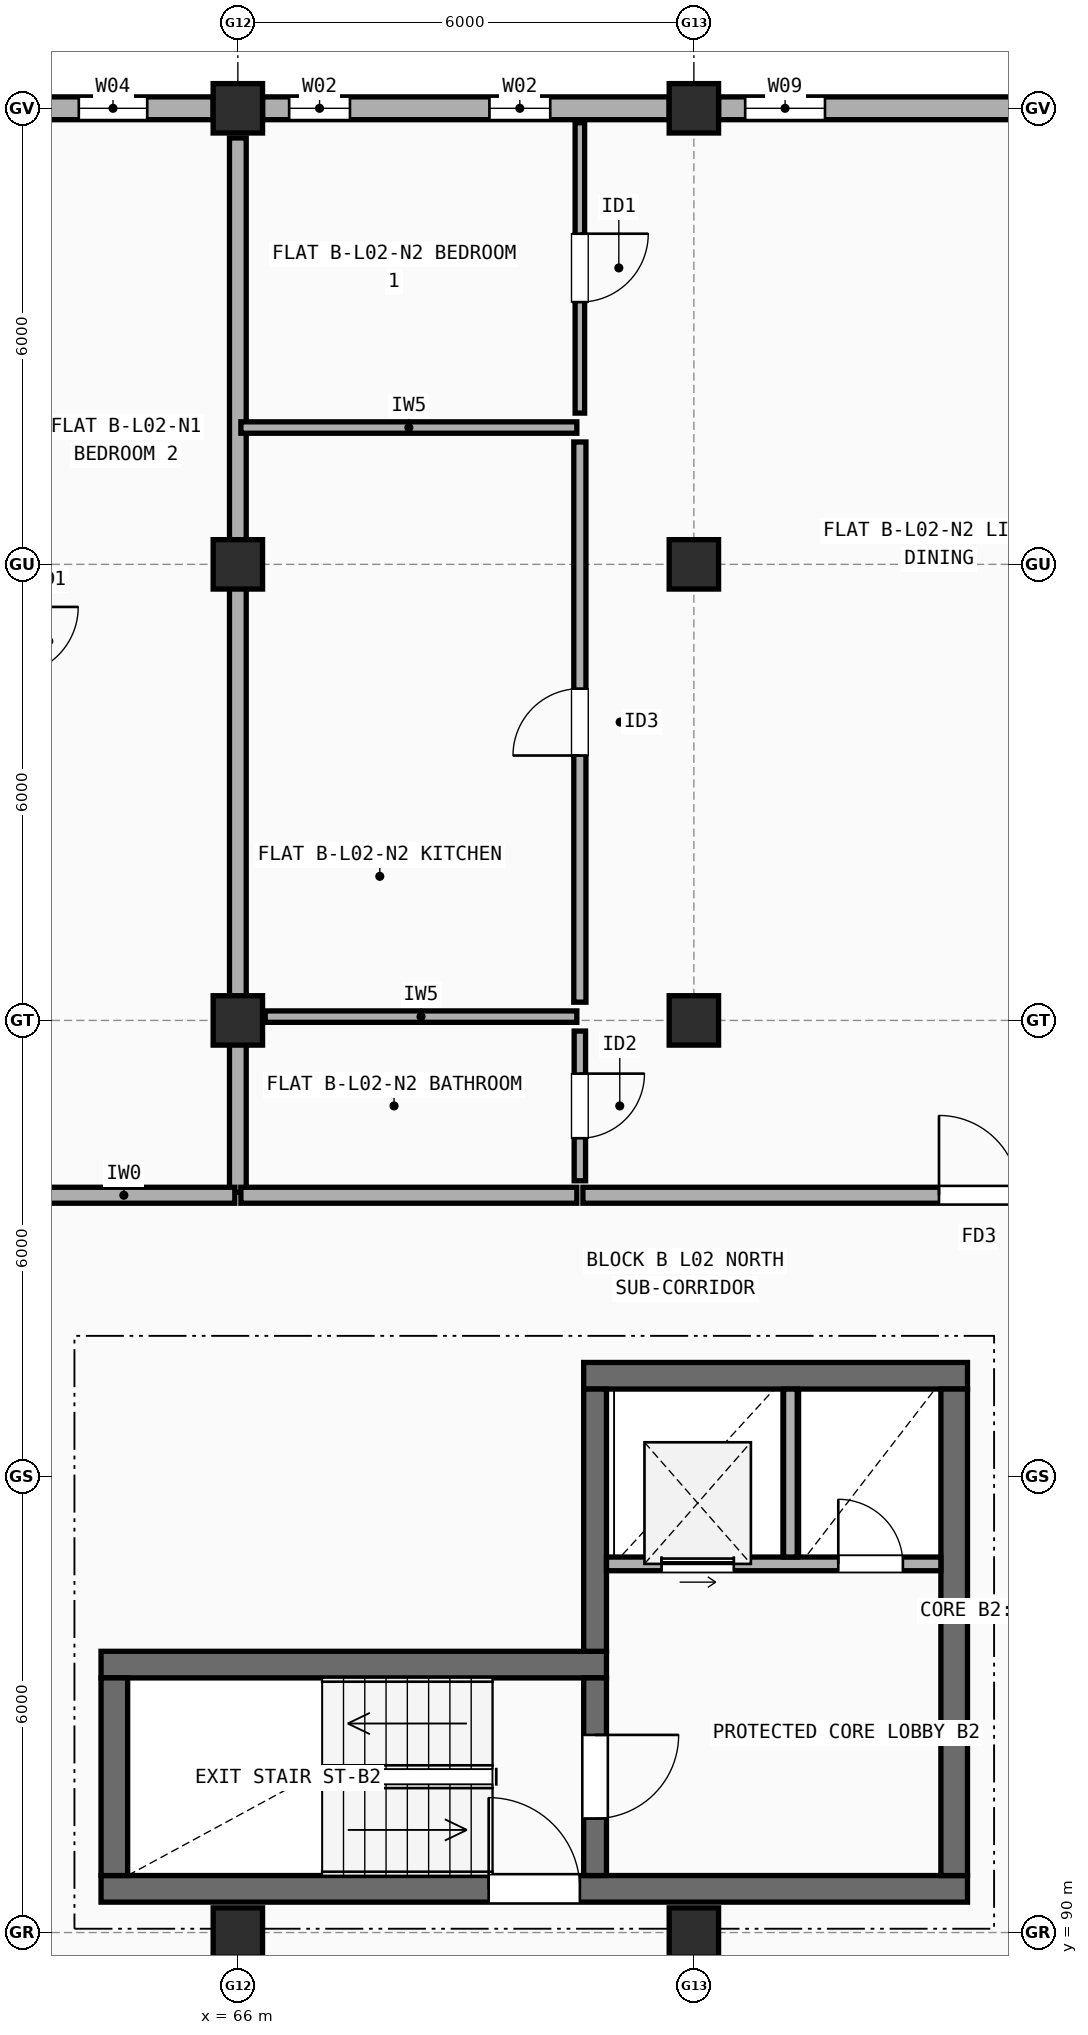
"""IFC4 building model, lengths in metres.
Left out: names, types, materials, properties, quantities, classifications, styles, units other than length and angle.
Written with IfcOpenShell. Run it as: python <this file> out.ifc"""

import sys

from ifc_helpers import new_model, si_unit, direction, frame, frame_2d, origin, origin_2d, place, context, subcontext, project, spatial, rectangle, extrude, element, fill, save


model = new_model("IFC4")
c1 = context("Model", 3, precision=1e-05, world=origin(), true_north=direction((0.0, 1.0)))
c2 = subcontext(c1, "Body", "Model", "MODEL_VIEW")
j1 = project(units=[si_unit("LENGTHUNIT", "METRE"), si_unit("PLANEANGLEUNIT", "RADIAN")], contexts=[c1])
p1 = place(None, origin())
s1 = spatial("IfcSite", under=j1, at=p1, CompositionType="ELEMENT")
p2 = place(p1, origin())
s2 = spatial("IfcBuilding", under=s1, at=p2, CompositionType="ELEMENT")
p3 = place(p2, frame((0.0, 0.0, 7.7)))
s3 = spatial("IfcBuildingStorey", under=s2, at=p3, CompositionType="ELEMENT", Elevation=7.7)
for number, where, z_axis, x_axis in (
    (1, (66.0, 90.0, 0.0), (0.0, 0.0, 1.0), (1.0, 0.0, 0.0)),
    (2, (66.0, 102.0, 0.0), (0.0, 0.0, 1.0), (1.0, 0.0, 0.0)),
    (3, (66.0, 108.0, 0.0), (0.0, 0.0, 1.0), (1.0, 0.0, 0.0)),
    (4, (66.0, 114.0, 0.0), (0.0, 0.0, 1.0), (1.0, 0.0, 0.0)),
    (5, (72.0, 90.0, 0.0), (0.0, 0.0, 1.0), (1.0, 0.0, 0.0)),
    (6, (72.0, 102.0, 0.0), (0.0, 0.0, 1.0), (1.0, 0.0, 0.0)),
    (7, (72.0, 108.0, 0.0), (0.0, 0.0, 1.0), (1.0, 0.0, 0.0)),
    (8, (72.0, 114.0, 0.0), (0.0, 0.0, 1.0), (1.0, 0.0, 0.0)),
):
    element("IfcColumn", number, at=place(p3, frame(where, z_axis=z_axis, x_axis=x_axis)), inside=s3, PredefinedType="COLUMN", context=c2, shape_type="SweptSolid", body=[
        extrude(rectangle(XDim=0.65, YDim=0.65, at=origin_2d()), origin(), (0.0, 0.0, 1.0), 2.955),
    ])
p4 = place(p3, frame((77.725, 114.0, 0.0), z_axis=(0.0, 0.0, 1.0), x_axis=(-1.0, 0.0, 0.0)))
e9 = element("IfcWall", 9, at=p4, inside=s3, PredefinedType="STANDARD", context=c2, shape_type="SweptSolid", body=[
    extrude(rectangle(XDim=5.4, YDim=0.3, at=frame_2d((2.7, 0.0))), origin(), (0.0, 0.0, 1.0), 2.437),
])
p5 = place(p4, frame((0.35, 0.0, 0.9)))
e10 = element("IfcOpeningElement", 10, at=p5, cuts=e9, PredefinedType="OPENING", context=c2, shape_type="SweptSolid", body=[
    extrude(rectangle(XDim=1.05, YDim=1.35, at=frame_2d((0.525, 0.675))), frame((0.0, 0.16, 0.0), z_axis=(0.0, -1.0, 0.0), x_axis=(1.0, 0.0, 0.0)), (0.0, 0.0, 1.0), 0.32),
])
p6 = place(p4, frame((4.0, 0.0, 0.9)))
e11 = element("IfcOpeningElement", 11, at=p6, cuts=e9, PredefinedType="OPENING", context=c2, shape_type="SweptSolid", body=[
    extrude(rectangle(XDim=1.05, YDim=1.35, at=frame_2d((0.525, 0.675))), frame((0.0, 0.16, 0.0), z_axis=(0.0, -1.0, 0.0), x_axis=(1.0, 0.0, 0.0)), (0.0, 0.0, 1.0), 0.32),
])
p7 = place(p3, frame((71.675, 114.0, 0.0), z_axis=(0.0, 0.0, 1.0), x_axis=(-1.0, 0.0, 0.0)))
e12 = element("IfcWall", 12, at=p7, inside=s3, PredefinedType="STANDARD", context=c2, shape_type="SweptSolid", body=[
    extrude(rectangle(XDim=5.35, YDim=0.3, at=frame_2d((2.675, 0.0))), origin(), (0.0, 0.0, 1.0), 2.437),
])
p8 = place(p7, frame((1.565, 0.0, 0.9)))
e13 = element("IfcOpeningElement", 13, at=p8, cuts=e12, PredefinedType="OPENING", context=c2, shape_type="SweptSolid", body=[
    extrude(rectangle(XDim=0.8, YDim=1.2, at=frame_2d((0.4, 0.6))), frame((0.0, 0.16, 0.0), z_axis=(0.0, -1.0, 0.0), x_axis=(1.0, 0.0, 0.0)), (0.0, 0.0, 1.0), 0.32),
])
p9 = place(p7, frame((4.2, 0.0, 0.9)))
e14 = element("IfcOpeningElement", 14, at=p9, cuts=e12, PredefinedType="OPENING", context=c2, shape_type="SweptSolid", body=[
    extrude(rectangle(XDim=0.8, YDim=1.2, at=frame_2d((0.4, 0.6))), frame((0.0, 0.16, 0.0), z_axis=(0.0, -1.0, 0.0), x_axis=(1.0, 0.0, 0.0)), (0.0, 0.0, 1.0), 0.32),
])
p10 = place(p3, frame((65.675, 114.0, 0.0), z_axis=(0.0, 0.0, 1.0), x_axis=(-1.0, 0.0, 0.0)))
e15 = element("IfcWall", 15, at=p10, inside=s3, PredefinedType="STANDARD", context=c2, shape_type="SweptSolid", body=[
    extrude(rectangle(XDim=5.35, YDim=0.3, at=frame_2d((2.675, 0.0))), origin(), (0.0, 0.0, 1.0), 2.437),
])
p11 = place(p10, frame((0.867, 0.0, 0.9)))
e16 = element("IfcOpeningElement", 16, at=p11, cuts=e15, PredefinedType="OPENING", context=c2, shape_type="SweptSolid", body=[
    extrude(rectangle(XDim=0.9, YDim=1.3, at=frame_2d((0.45, 0.65))), frame((0.0, 0.16, 0.0), z_axis=(0.0, -1.0, 0.0), x_axis=(1.0, 0.0, 0.0)), (0.0, 0.0, 1.0), 0.32),
])
p12 = place(p10, frame((3.558, 0.0, 0.9)))
e17 = element("IfcOpeningElement", 17, at=p12, cuts=e15, PredefinedType="OPENING", context=c2, shape_type="SweptSolid", body=[
    extrude(rectangle(XDim=0.95, YDim=1.35, at=frame_2d((0.475, 0.675))), frame((0.0, 0.16, 0.0), z_axis=(0.0, -1.0, 0.0), x_axis=(1.0, 0.0, 0.0)), (0.0, 0.0, 1.0), 0.32),
])
p13 = place(p3, frame((64.2, 90.575, 0.0), z_axis=(0.0, 0.0, 1.0), x_axis=(1.0, 0.0, 0.0)))
e18 = element("IfcWall", 18, at=p13, inside=s3, PredefinedType="SHEAR", context=c2, shape_type="SweptSolid", body=[
    extrude(rectangle(XDim=11.4, YDim=0.35, at=frame_2d((5.7, 0.0))), origin(), (0.0, 0.0, 1.0), 2.955),
])
p14 = place(p13, frame((5.1, 0.0, 0.0)))
e19 = element("IfcOpeningElement", 19, at=p14, cuts=e18, PredefinedType="OPENING", context=c2, shape_type="SweptSolid", body=[
    extrude(rectangle(XDim=1.2, YDim=2.15, at=frame_2d((0.6, 1.075))), frame((0.0, 0.185, 0.0), z_axis=(0.0, -1.0, 0.0), x_axis=(1.0, 0.0, 0.0)), (0.0, 0.0, 1.0), 0.37),
])
p15 = place(p3, frame((70.85, 93.525, 0.0), z_axis=(0.0, 0.0, 1.0), x_axis=(-1.0, 0.0, 0.0)))
e20 = element("IfcWall", 20, at=p15, inside=s3, PredefinedType="SHEAR", context=c2, shape_type="SweptSolid", body=[
    extrude(rectangle(XDim=6.65, YDim=0.35, at=frame_2d((3.325, 0.0))), origin(), (0.0, 0.0, 1.0), 2.955),
])
p16 = place(p3, frame((64.375, 93.35, 0.0), z_axis=(0.0, 0.0, 1.0), x_axis=(0.0, -1.0, 0.0)))
e21 = element("IfcWall", 21, at=p16, inside=s3, PredefinedType="SHEAR", context=c2, shape_type="SweptSolid", body=[
    extrude(rectangle(XDim=2.6, YDim=0.35, at=frame_2d((1.3, 0.0))), origin(), (0.0, 0.0, 1.0), 2.955),
])
p17 = place(p3, frame((70.7, 90.75, 0.0), z_axis=(0.0, 0.0, 1.0), x_axis=(0.0, 1.0, 0.0)))
e22 = element("IfcWall", 22, at=p17, inside=s3, PredefinedType="SHEAR", context=c2, shape_type="SweptSolid", body=[
    extrude(rectangle(XDim=2.6, YDim=0.3, at=frame_2d((1.3, 0.0))), origin(), (0.0, 0.0, 1.0), 2.955),
])
p18 = place(p17, frame((0.75, 0.0, 0.0)))
e23 = element("IfcOpeningElement", 23, at=p18, cuts=e22, PredefinedType="OPENING", context=c2, shape_type="SweptSolid", body=[
    extrude(rectangle(XDim=1.1, YDim=2.15, at=frame_2d((0.55, 1.075))), frame((0.0, 0.16, 0.0), z_axis=(0.0, -1.0, 0.0), x_axis=(1.0, 0.0, 0.0)), (0.0, 0.0, 1.0), 0.32),
])
p19 = place(p3, frame((75.6, 97.325, 0.0), z_axis=(0.0, 0.0, 1.0), x_axis=(-1.0, 0.0, 0.0)))
e24 = element("IfcWall", 24, at=p19, inside=s3, PredefinedType="SHEAR", context=c2, shape_type="SweptSolid", body=[
    extrude(rectangle(XDim=5.05, YDim=0.35, at=frame_2d((2.525, 0.0))), origin(), (0.0, 0.0, 1.0), 2.955),
])
p20 = place(p3, frame((75.425, 90.75, 0.0), z_axis=(0.0, 0.0, 1.0), x_axis=(0.0, 1.0, 0.0)))
e25 = element("IfcWall", 25, at=p20, inside=s3, PredefinedType="SHEAR", context=c2, shape_type="SweptSolid", body=[
    extrude(rectangle(XDim=6.4, YDim=0.35, at=frame_2d((3.2, 0.0))), origin(), (0.0, 0.0, 1.0), 2.955),
])
p21 = place(p3, frame((70.7, 93.7, 0.0), z_axis=(0.0, 0.0, 1.0), x_axis=(0.0, 1.0, 0.0)))
e26 = element("IfcWall", 26, at=p21, inside=s3, PredefinedType="SHEAR", context=c2, shape_type="SweptSolid", body=[
    extrude(rectangle(XDim=3.45, YDim=0.3, at=frame_2d((1.725, 0.0))), origin(), (0.0, 0.0, 1.0), 2.955),
])
p22 = place(p3, frame((70.85, 94.85, 0.0), z_axis=(0.0, 0.0, 1.0), x_axis=(1.0, 0.0, 0.0)))
e27 = element("IfcWall", 27, at=p22, inside=s3, PredefinedType="SOLIDWALL", context=c2, shape_type="SweptSolid", body=[
    extrude(rectangle(XDim=4.4, YDim=0.18, at=frame_2d((2.2, 0.0))), origin(), (0.0, 0.0, 1.0), 2.955),
])
p23 = place(p22, frame((0.725, 0.0, 0.0)))
e28 = element("IfcOpeningElement", 28, at=p23, cuts=e27, PredefinedType="OPENING", context=c2, shape_type="SweptSolid", body=[
    extrude(rectangle(XDim=0.95, YDim=2.15, at=frame_2d((0.475, 1.075))), frame((0.0, 0.1, 0.0), z_axis=(0.0, -1.0, 0.0), x_axis=(1.0, 0.0, 0.0)), (0.0, 0.0, 1.0), 0.2),
])
p24 = place(p22, frame((3.05, 0.0, 0.0)))
e29 = element("IfcOpeningElement", 29, at=p24, cuts=e27, PredefinedType="OPENING", context=c2, shape_type="SweptSolid", body=[
    extrude(rectangle(XDim=0.85, YDim=2.1, at=frame_2d((0.425, 1.05))), frame((0.0, 0.1, 0.0), z_axis=(0.0, -1.0, 0.0), x_axis=(1.0, 0.0, 0.0)), (0.0, 0.0, 1.0), 0.2),
])
p25 = place(p3, frame((73.27, 94.94, 0.0), z_axis=(0.0, 0.0, 1.0), x_axis=(0.0, 1.0, 0.0)))
e30 = element("IfcWall", 30, at=p25, inside=s3, PredefinedType="SOLIDWALL", context=c2, shape_type="SweptSolid", body=[
    extrude(rectangle(XDim=2.21, YDim=0.18, at=frame_2d((1.105, 0.0))), origin(), (0.0, 0.0, 1.0), 2.955),
])
p26 = place(p3, frame((66.0, 99.74, 0.0), z_axis=(0.0, 0.0, 1.0), x_axis=(0.0, 1.0, 0.0)))
e31 = element("IfcWall", 31, at=p26, inside=s3, PredefinedType="SOLIDWALL", context=c2, shape_type="SweptSolid", body=[
    extrude(rectangle(XDim=13.87, YDim=0.22, at=frame_2d((6.935, 0.0))), origin(), (0.0, 0.0, 1.0), 2.337),
])
p27 = place(p3, frame((63.04, 99.7, 0.0), z_axis=(0.0, 0.0, 1.0), x_axis=(1.0, 0.0, 0.0)))
e32 = element("IfcWall", 32, at=p27, inside=s3, PredefinedType="SOLIDWALL", context=c2, shape_type="SweptSolid", body=[
    extrude(rectangle(XDim=2.92, YDim=0.21, at=frame_2d((1.46, 0.0))), origin(), (0.0, 0.0, 1.0), 2.955),
])
p28 = place(p3, frame((66.04, 99.7, 0.0), z_axis=(0.0, 0.0, 1.0), x_axis=(1.0, 0.0, 0.0)))
e33 = element("IfcWall", 33, at=p28, inside=s3, PredefinedType="SOLIDWALL", context=c2, shape_type="SweptSolid", body=[
    extrude(rectangle(XDim=4.42, YDim=0.21, at=frame_2d((2.21, 0.0))), origin(), (0.0, 0.0, 1.0), 2.955),
])
p29 = place(p3, frame((70.54, 99.7, 0.0), z_axis=(0.0, 0.0, 1.0), x_axis=(1.0, 0.0, 0.0)))
e34 = element("IfcWall", 34, at=p29, inside=s3, PredefinedType="SOLIDWALL", context=c2, shape_type="SweptSolid", body=[
    extrude(rectangle(XDim=10.42, YDim=0.21, at=frame_2d((5.21, 0.0))), origin(), (0.0, 0.0, 1.0), 2.437),
])
p30 = place(p29, frame((4.685, 0.0, 0.0)))
e35 = element("IfcOpeningElement", 35, at=p30, cuts=e34, PredefinedType="OPENING", context=c2, shape_type="SweptSolid", body=[
    extrude(rectangle(XDim=1.05, YDim=2.15, at=frame_2d((0.525, 1.075))), frame((0.0, 0.115, 0.0), z_axis=(0.0, -1.0, 0.0), x_axis=(1.0, 0.0, 0.0)), (0.0, 0.0, 1.0), 0.23),
])
p31 = place(p3, frame((70.5, 109.99, 0.0), z_axis=(0.0, 0.0, 1.0), x_axis=(0.0, 1.0, 0.0)))
e36 = element("IfcWall", 36, at=p31, inside=s3, PredefinedType="PARTITIONING", context=c2, shape_type="SweptSolid", body=[
    extrude(rectangle(XDim=3.82, YDim=0.125, at=frame_2d((1.91, 0.0))), origin(), (0.0, 0.0, 1.0), 2.955),
])
p32 = place(p31, frame((1.46, 0.0, 0.0)))
e37 = element("IfcOpeningElement", 37, at=p32, cuts=e36, PredefinedType="OPENING", context=c2, shape_type="SweptSolid", body=[
    extrude(rectangle(XDim=0.9, YDim=2.1, at=frame_2d((0.45, 1.05))), frame((0.0, 0.073, 0.0), z_axis=(0.0, -1.0, 0.0), x_axis=(1.0, 0.0, 0.0)), (0.0, 0.0, 1.0), 0.145),
])
p33 = place(p3, frame((70.5, 102.24, 0.0), z_axis=(0.0, 0.0, 1.0), x_axis=(0.0, 1.0, 0.0)))
e38 = element("IfcWall", 38, at=p33, inside=s3, PredefinedType="PLUMBINGWALL", context=c2, shape_type="SweptSolid", body=[
    extrude(rectangle(XDim=7.37, YDim=0.16, at=frame_2d((3.685, 0.0))), origin(), (0.0, 0.0, 1.0), 2.437),
])
p34 = place(p33, frame((3.245, 0.0, 0.0)))
e39 = element("IfcOpeningElement", 39, at=p34, cuts=e38, PredefinedType="OPENING", context=c2, shape_type="SweptSolid", body=[
    extrude(rectangle(XDim=0.88, YDim=2.1, at=frame_2d((0.44, 1.05))), frame((0.0, 0.09, 0.0), z_axis=(0.0, -1.0, 0.0), x_axis=(1.0, 0.0, 0.0)), (0.0, 0.0, 1.0), 0.18),
])
p35 = place(p3, frame((70.5, 99.89, 0.0), z_axis=(0.0, 0.0, 1.0), x_axis=(0.0, 1.0, 0.0)))
e40 = element("IfcWall", 40, at=p35, inside=s3, PredefinedType="PARTITIONING", context=c2, shape_type="SweptSolid", body=[
    extrude(rectangle(XDim=1.97, YDim=0.15, at=frame_2d((0.985, 0.0))), origin(), (0.0, 0.0, 1.0), 2.955),
])
p36 = place(p35, frame((0.56, 0.0, 0.0)))
e41 = element("IfcOpeningElement", 41, at=p36, cuts=e40, PredefinedType="OPENING", context=c2, shape_type="SweptSolid", body=[
    extrude(rectangle(XDim=0.85, YDim=2.1, at=frame_2d((0.425, 1.05))), frame((0.0, 0.085, 0.0), z_axis=(0.0, -1.0, 0.0), x_axis=(1.0, 0.0, 0.0)), (0.0, 0.0, 1.0), 0.17),
])
p37 = place(p3, frame((66.04, 109.8, 0.0), z_axis=(0.0, 0.0, 1.0), x_axis=(1.0, 0.0, 0.0)))
e42 = element("IfcWall", 42, at=p37, inside=s3, PredefinedType="PARTITIONING", context=c2, shape_type="SweptSolid", body=[
    extrude(rectangle(XDim=4.42, YDim=0.15, at=frame_2d((2.21, 0.0))), origin(), (0.0, 0.0, 1.0), 2.337),
])
p38 = place(p3, frame((66.36, 102.05, 0.0), z_axis=(0.0, 0.0, 1.0), x_axis=(1.0, 0.0, 0.0)))
e43 = element("IfcWall", 43, at=p38, inside=s3, PredefinedType="PARTITIONING", context=c2, shape_type="SweptSolid", body=[
    extrude(rectangle(XDim=4.1, YDim=0.15, at=frame_2d((2.05, 0.0))), origin(), (0.0, 0.0, 1.0), 2.437),
])
p39 = place(p6, origin())
e44 = element("IfcWindow", 44, at=p39, inside=s3, PartitioningType="SINGLE_PANEL", PredefinedType="WINDOW", context=c2, shape_type="SweptSolid", body=[
    extrude(rectangle(XDim=1.05, YDim=1.35, at=frame_2d((0.525, 0.675))), frame((0.0, 0.03, 0.0), z_axis=(0.0, -1.0, 0.0), x_axis=(1.0, 0.0, 0.0)), (0.0, 0.0, 1.0), 0.06),
])
fill(e11, e44)
p40 = place(p8, origin())
e45 = element("IfcWindow", 45, at=p40, inside=s3, PartitioningType="SINGLE_PANEL", PredefinedType="WINDOW", context=c2, shape_type="SweptSolid", body=[
    extrude(rectangle(XDim=0.8, YDim=1.2, at=frame_2d((0.4, 0.6))), frame((0.0, 0.03, 0.0), z_axis=(0.0, -1.0, 0.0), x_axis=(1.0, 0.0, 0.0)), (0.0, 0.0, 1.0), 0.06),
])
fill(e13, e45)
p41 = place(p9, origin())
e46 = element("IfcWindow", 46, at=p41, inside=s3, PartitioningType="SINGLE_PANEL", PredefinedType="WINDOW", context=c2, shape_type="SweptSolid", body=[
    extrude(rectangle(XDim=0.8, YDim=1.2, at=frame_2d((0.4, 0.6))), frame((0.0, 0.03, 0.0), z_axis=(0.0, -1.0, 0.0), x_axis=(1.0, 0.0, 0.0)), (0.0, 0.0, 1.0), 0.06),
])
fill(e14, e46)
p42 = place(p11, origin())
e47 = element("IfcWindow", 47, at=p42, inside=s3, PartitioningType="SINGLE_PANEL", PredefinedType="WINDOW", context=c2, shape_type="SweptSolid", body=[
    extrude(rectangle(XDim=0.9, YDim=1.3, at=frame_2d((0.45, 0.65))), frame((0.0, 0.03, 0.0), z_axis=(0.0, -1.0, 0.0), x_axis=(1.0, 0.0, 0.0)), (0.0, 0.0, 1.0), 0.06),
])
fill(e16, e47)
p43 = place(p14, origin())
e48 = element("IfcDoor", 48, at=p43, inside=s3, OperationType="SINGLE_SWING_LEFT", PredefinedType="DOOR", context=c2, shape_type="SweptSolid", body=[
    extrude(rectangle(XDim=1.2, YDim=2.15, at=frame_2d((0.6, 1.075))), frame((0.0, 0.025, 0.0), z_axis=(0.0, -1.0, 0.0), x_axis=(1.0, 0.0, 0.0)), (0.0, 0.0, 1.0), 0.05),
])
fill(e19, e48)
p44 = place(p18, origin())
e49 = element("IfcDoor", 49, at=p44, inside=s3, OperationType="SINGLE_SWING_RIGHT", PredefinedType="DOOR", context=c2, shape_type="SweptSolid", body=[
    extrude(rectangle(XDim=1.1, YDim=2.15, at=frame_2d((0.55, 1.075))), frame((0.0, 0.025, 0.0), z_axis=(0.0, -1.0, 0.0), x_axis=(1.0, 0.0, 0.0)), (0.0, 0.0, 1.0), 0.05),
])
fill(e23, e49)
p45 = place(p23, origin())
e50 = element("IfcDoor", 50, at=p45, inside=s3, OperationType="SLIDING_TO_LEFT", PredefinedType="DOOR", context=c2, shape_type="SweptSolid", body=[
    extrude(rectangle(XDim=0.95, YDim=2.15, at=frame_2d((0.475, 1.075))), frame((0.0, 0.025, 0.0), z_axis=(0.0, -1.0, 0.0), x_axis=(1.0, 0.0, 0.0)), (0.0, 0.0, 1.0), 0.05),
])
fill(e28, e50)
p46 = place(p24, frame((0.85, 0.0, 0.0), z_axis=(0.0, 0.0, 1.0), x_axis=(-1.0, 0.0, 0.0)))
e51 = element("IfcDoor", 51, at=p46, inside=s3, OperationType="SINGLE_SWING_LEFT", PredefinedType="DOOR", context=c2, shape_type="SweptSolid", body=[
    extrude(rectangle(XDim=0.85, YDim=2.1, at=frame_2d((0.425, 1.05))), frame((0.0, 0.025, 0.0), z_axis=(0.0, -1.0, 0.0), x_axis=(1.0, 0.0, 0.0)), (0.0, 0.0, 1.0), 0.05),
])
fill(e29, e51)
p47 = place(p30, origin())
e52 = element("IfcDoor", 52, at=p47, inside=s3, OperationType="SINGLE_SWING_LEFT", PredefinedType="DOOR", context=c2, shape_type="SweptSolid", body=[
    extrude(rectangle(XDim=1.05, YDim=2.15, at=frame_2d((0.525, 1.075))), frame((0.0, 0.025, 0.0), z_axis=(0.0, -1.0, 0.0), x_axis=(1.0, 0.0, 0.0)), (0.0, 0.0, 1.0), 0.05),
])
fill(e35, e52)
p48 = place(p32, origin())
e53 = element("IfcDoor", 53, at=p48, inside=s3, OperationType="SINGLE_SWING_RIGHT", PredefinedType="DOOR", context=c2, shape_type="SweptSolid", body=[
    extrude(rectangle(XDim=0.9, YDim=2.1, at=frame_2d((0.45, 1.05))), frame((0.0, 0.025, 0.0), z_axis=(0.0, -1.0, 0.0), x_axis=(1.0, 0.0, 0.0)), (0.0, 0.0, 1.0), 0.05),
])
fill(e37, e53)
p49 = place(p34, origin())
e54 = element("IfcDoor", 54, at=p49, inside=s3, OperationType="SINGLE_SWING_LEFT", PredefinedType="DOOR", context=c2, shape_type="SweptSolid", body=[
    extrude(rectangle(XDim=0.88, YDim=2.1, at=frame_2d((0.44, 1.05))), frame((0.0, 0.025, 0.0), z_axis=(0.0, -1.0, 0.0), x_axis=(1.0, 0.0, 0.0)), (0.0, 0.0, 1.0), 0.05),
])
fill(e39, e54)
p50 = place(p36, origin())
e55 = element("IfcDoor", 55, at=p50, inside=s3, OperationType="SINGLE_SWING_RIGHT", PredefinedType="DOOR", context=c2, shape_type="SweptSolid", body=[
    extrude(rectangle(XDim=0.85, YDim=2.1, at=frame_2d((0.425, 1.05))), frame((0.0, 0.025, 0.0), z_axis=(0.0, -1.0, 0.0), x_axis=(1.0, 0.0, 0.0)), (0.0, 0.0, 1.0), 0.05),
])
fill(e41, e55)
save(model, sys.argv[1])
